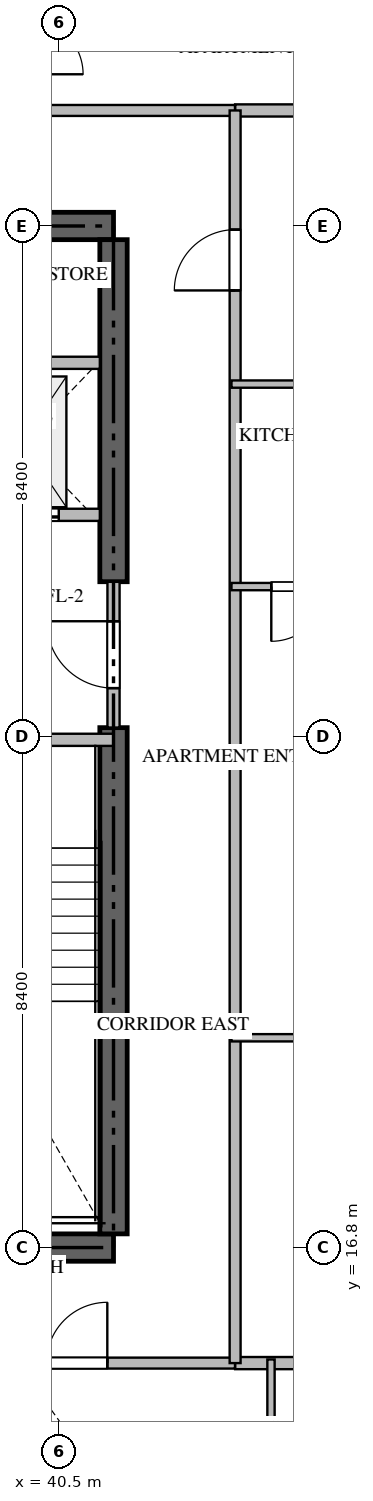
"""IFC4 building model, lengths in metres.
Left out: names, types, materials, properties, quantities, classifications, styles, units other than length and angle.
Written with IfcOpenShell. Run it as: python <this file> out.ifc"""

import sys

from ifc_helpers import new_model, si_unit, direction, frame, frame_2d, origin, place, context, subcontext, project, spatial, rectangle, extrude, source, transform, mapped, element, fill, save


model = new_model("IFC4")
c1 = context("Model", 3, precision=1e-05, world=origin(), true_north=direction((0.0, 1.0)))
c2 = subcontext(c1, "Body", "Model", "MODEL_VIEW")
j1 = project(units=[si_unit("LENGTHUNIT", "METRE"), si_unit("PLANEANGLEUNIT", "RADIAN")], contexts=[c1])
p1 = place(None, origin())
s1 = spatial("IfcSite", under=j1, at=p1, CompositionType="ELEMENT")
p2 = place(p1, origin())
s2 = spatial("IfcBuilding", under=s1, at=p2, CompositionType="ELEMENT")
p3 = place(p2, frame((0.0, 0.0, 56.7)))
s3 = spatial("IfcBuildingStorey", under=s2, at=p3, CompositionType="ELEMENT", Elevation=56.7)
for number, where, z_axis, x_axis in (
    (1, (23.4, 16.8, -0.26), (0.0, 0.0, 1.0), (1.0, 0.0, 0.0)),
    (2, (41.4, 33.6, -0.26), (0.0, 0.0, 1.0), (-1.0, 0.0, 0.0)),
):
    element("IfcWall", number, at=place(p3, frame(where, z_axis=z_axis, x_axis=x_axis)), inside=s3, PredefinedType="SHEAR", context=c2, shape_type="SweptSolid", body=[
        extrude(rectangle(XDim=18.0, YDim=0.45, at=frame_2d((9.0, 0.0))), origin(), (0.0, 0.0, 1.0), 3.748),
    ])
p4 = place(p3, frame((41.4, 17.025, -0.26), z_axis=(0.0, 0.0, 1.0), x_axis=(0.0, 1.0, 0.0)))
e3 = element("IfcWall", 3, at=p4, inside=s3, PredefinedType="SHEAR", context=c2, shape_type="SweptSolid", body=[
    extrude(rectangle(XDim=8.325, YDim=0.45, at=frame_2d((4.163, 0.0))), origin(), (0.0, 0.0, 1.0), 3.748),
])
p5 = place(p3, frame((41.4, 27.75, -0.26), z_axis=(0.0, 0.0, 1.0), x_axis=(0.0, 1.0, 0.0)))
e4 = element("IfcWall", 4, at=p5, inside=s3, PredefinedType="SHEAR", context=c2, shape_type="SweptSolid", body=[
    extrude(rectangle(XDim=5.625, YDim=0.45, at=frame_2d((2.812, 0.0))), origin(), (0.0, 0.0, 1.0), 3.748),
])
p6 = place(p3, frame((36.95, 25.15, 0.0), z_axis=(0.0, 0.0, 1.0), x_axis=(1.0, 0.0, 0.0)))
e5 = element("IfcWall", 5, at=p6, inside=s3, PredefinedType="STANDARD", context=c2, shape_type="SweptSolid", body=[
    extrude(rectangle(XDim=4.45, YDim=0.2, at=frame_2d((2.225, 0.0))), origin(), (0.0, 0.0, 1.0), 3.49),
])
p7 = place(p6, frame((1.65, 0.0, 0.0)))
e6 = element("IfcOpeningElement", 6, at=p7, cuts=e5, PredefinedType="OPENING", context=c2, shape_type="SweptSolid", body=[
    extrude(rectangle(XDim=1.1, YDim=2.15, at=frame_2d((0.55, 1.075))), frame((0.0, 0.11, 0.0), z_axis=(0.0, -1.0, 0.0), x_axis=(1.0, 0.0, 0.0)), (0.0, 0.0, 1.0), 0.22),
])
p8 = place(p3, frame((38.75, 28.85, 0.0), z_axis=(0.0, 0.0, 1.0), x_axis=(1.0, 0.0, 0.0)))
e7 = element("IfcWall", 7, at=p8, inside=s3, PredefinedType="STANDARD", context=c2, shape_type="SweptSolid", body=[
    extrude(rectangle(XDim=2.425, YDim=0.2, at=frame_2d((1.212, 0.0))), origin(), (0.0, 0.0, 1.0), 3.49),
])
p9 = place(p8, frame((0.55, 0.0, 0.0)))
e8 = element("IfcOpeningElement", 8, at=p9, cuts=e7, PredefinedType="OPENING", context=c2, shape_type="SweptSolid", body=[
    extrude(rectangle(XDim=1.2, YDim=2.2, at=frame_2d((0.6, 1.1))), frame((0.0, 0.11, 0.0), z_axis=(0.0, -1.0, 0.0), x_axis=(1.0, 0.0, 0.0)), (0.0, 0.0, 1.0), 0.22),
])
p10 = place(p3, frame((38.75, 31.35, 0.0), z_axis=(0.0, 0.0, 1.0), x_axis=(1.0, 0.0, 0.0)))
e9 = element("IfcWall", 9, at=p10, inside=s3, PredefinedType="STANDARD", context=c2, shape_type="SweptSolid", body=[
    extrude(rectangle(XDim=2.425, YDim=0.2, at=frame_2d((1.212, 0.0))), origin(), (0.0, 0.0, 1.0), 3.49),
])
p11 = place(p3, frame((41.4, 25.352, 0.0), z_axis=(0.0, 0.0, 1.0), x_axis=(0.0, 1.0, 0.0)))
e10 = element("IfcWall", 10, at=p11, inside=s3, PredefinedType="STANDARD", context=c2, shape_type="SweptSolid", body=[
    extrude(rectangle(XDim=2.396, YDim=0.2, at=frame_2d((1.198, 0.0))), origin(), (0.0, 0.0, 1.0), 3.49),
])
p12 = place(p11, frame((0.648, 0.0, 0.0)))
e11 = element("IfcOpeningElement", 11, at=p12, cuts=e10, PredefinedType="OPENING", context=c2, shape_type="SweptSolid", body=[
    extrude(rectangle(XDim=1.1, YDim=2.15, at=frame_2d((0.55, 1.075))), frame((0.0, 0.11, 0.0), z_axis=(0.0, -1.0, 0.0), x_axis=(1.0, 0.0, 0.0)), (0.0, 0.0, 1.0), 0.22),
])
for number, where, z_axis, x_axis in (
    (12, (43.4, 14.9, 0.0), (0.0, 0.0, 1.0), (1.0, 0.0, 0.0)),
    (13, (43.4, 35.5, 0.0), (0.0, 0.0, 1.0), (1.0, 0.0, 0.0)),
):
    element("IfcWall", number, at=place(p3, frame(where, z_axis=z_axis, x_axis=x_axis)), inside=s3, PredefinedType="PARTITIONING", context=c2, shape_type="SweptSolid", body=[
        extrude(rectangle(XDim=15.318, YDim=0.2, at=frame_2d((7.659, 0.0))), origin(), (0.0, 0.0, 1.0), 3.49),
    ])
p13 = place(p3, frame((21.402, 14.9, 0.0), z_axis=(0.0, 0.0, 1.0), x_axis=(1.0, 0.0, 0.0)))
e14 = element("IfcWall", 14, at=p13, inside=s3, PredefinedType="PARTITIONING", context=c2, shape_type="SweptSolid", body=[
    extrude(rectangle(XDim=21.996, YDim=0.18, at=frame_2d((10.998, 0.0))), origin(), (0.0, 0.0, 1.0), 3.49),
])
p14 = place(p13, frame((1.96, 0.0, 0.0)))
e15 = element("IfcOpeningElement", 15, at=p14, cuts=e14, PredefinedType="OPENING", context=c2, shape_type="SweptSolid", body=[
    extrude(rectangle(XDim=1.0, YDim=2.15, at=frame_2d((0.5, 1.075))), frame((0.0, 0.1, 0.0), z_axis=(0.0, -1.0, 0.0), x_axis=(1.0, 0.0, 0.0)), (0.0, 0.0, 1.0), 0.2),
])
p15 = place(p13, frame((5.249, 0.0, 0.0)))
e16 = element("IfcOpeningElement", 16, at=p15, cuts=e14, PredefinedType="OPENING", context=c2, shape_type="SweptSolid", body=[
    extrude(rectangle(XDim=1.0, YDim=2.15, at=frame_2d((0.5, 1.075))), frame((0.0, 0.1, 0.0), z_axis=(0.0, -1.0, 0.0), x_axis=(1.0, 0.0, 0.0)), (0.0, 0.0, 1.0), 0.2),
])
p16 = place(p13, frame((11.653, 0.0, 0.0)))
e17 = element("IfcOpeningElement", 17, at=p16, cuts=e14, PredefinedType="OPENING", context=c2, shape_type="SweptSolid", body=[
    extrude(rectangle(XDim=1.0, YDim=2.15, at=frame_2d((0.5, 1.075))), frame((0.0, 0.1, 0.0), z_axis=(0.0, -1.0, 0.0), x_axis=(1.0, 0.0, 0.0)), (0.0, 0.0, 1.0), 0.2),
])
p17 = place(p13, frame((18.896, 0.0, 0.0)))
e18 = element("IfcOpeningElement", 18, at=p17, cuts=e14, PredefinedType="OPENING", context=c2, shape_type="SweptSolid", body=[
    extrude(rectangle(XDim=1.0, YDim=2.15, at=frame_2d((0.5, 1.075))), frame((0.0, 0.1, 0.0), z_axis=(0.0, -1.0, 0.0), x_axis=(1.0, 0.0, 0.0)), (0.0, 0.0, 1.0), 0.2),
])
p18 = place(p3, frame((21.402, 35.5, 0.0), z_axis=(0.0, 0.0, 1.0), x_axis=(1.0, 0.0, 0.0)))
e19 = element("IfcWall", 19, at=p18, inside=s3, PredefinedType="PARTITIONING", context=c2, shape_type="SweptSolid", body=[
    extrude(rectangle(XDim=21.996, YDim=0.18, at=frame_2d((10.998, 0.0))), origin(), (0.0, 0.0, 1.0), 3.49),
])
p19 = place(p18, frame((15.222, 0.0, 0.0)))
e20 = element("IfcOpeningElement", 20, at=p19, cuts=e19, PredefinedType="OPENING", context=c2, shape_type="SweptSolid", body=[
    extrude(rectangle(XDim=1.0, YDim=2.15, at=frame_2d((0.5, 1.075))), frame((0.0, 0.1, 0.0), z_axis=(0.0, -1.0, 0.0), x_axis=(1.0, 0.0, 0.0)), (0.0, 0.0, 1.0), 0.2),
])
p20 = place(p3, frame((43.4, 14.9, 0.0), z_axis=(0.0, 0.0, 1.0), x_axis=(0.0, 1.0, 0.0)))
e21 = element("IfcWall", 21, at=p20, inside=s3, PredefinedType="PARTITIONING", context=c2, shape_type="SweptSolid", body=[
    extrude(rectangle(XDim=20.6, YDim=0.18, at=frame_2d((10.3, 0.0))), origin(), (0.0, 0.0, 1.0), 3.49),
])
p21 = place(p20, frame((17.64, 0.0, 0.0)))
e22 = element("IfcOpeningElement", 22, at=p21, cuts=e21, PredefinedType="OPENING", context=c2, shape_type="SweptSolid", body=[
    extrude(rectangle(XDim=1.0, YDim=2.15, at=frame_2d((0.5, 1.075))), frame((0.0, 0.1, 0.0), z_axis=(0.0, -1.0, 0.0), x_axis=(1.0, 0.0, 0.0)), (0.0, 0.0, 1.0), 0.2),
])
p22 = place(p3, frame((43.99, 12.15, 0.0), z_axis=(0.0, 0.0, 1.0), x_axis=(0.0, 1.0, 0.0)))
e23 = element("IfcWall", 23, at=p22, inside=s3, PredefinedType="PARTITIONING", context=c2, shape_type="SweptSolid", body=[
    extrude(rectangle(XDim=2.81, YDim=0.12, at=frame_2d((1.405, 0.0))), origin(), (0.0, 0.0, 1.0), 3.49),
])
p23 = place(p3, frame((46.15, 31.0, 0.0), z_axis=(0.0, 0.0, 1.0), x_axis=(-1.0, 0.0, 0.0)))
e24 = element("IfcWall", 24, at=p23, inside=s3, PredefinedType="PARTITIONING", context=c2, shape_type="SweptSolid", body=[
    extrude(rectangle(XDim=2.81, YDim=0.12, at=frame_2d((1.405, 0.0))), origin(), (0.0, 0.0, 1.0), 3.49),
])
p24 = place(p3, frame((45.55, 27.67, 0.0), z_axis=(0.0, 0.0, 1.0), x_axis=(-1.0, 0.0, 0.0)))
e25 = element("IfcWall", 25, at=p24, inside=s3, PredefinedType="PARTITIONING", context=c2, shape_type="SweptSolid", body=[
    extrude(rectangle(XDim=2.21, YDim=0.12, at=frame_2d((1.105, 0.0))), origin(), (0.0, 0.0, 1.0), 3.49),
])
p25 = place(p24, frame((0.655, 0.0, 0.0)))
e26 = element("IfcOpeningElement", 26, at=p25, cuts=e25, PredefinedType="OPENING", context=c2, shape_type="SweptSolid", body=[
    extrude(rectangle(XDim=0.9, YDim=2.1, at=frame_2d((0.45, 1.05))), frame((0.0, 0.07, 0.0), z_axis=(0.0, -1.0, 0.0), x_axis=(1.0, 0.0, 0.0)), (0.0, 0.0, 1.0), 0.14),
])
p26 = place(p3, frame((45.548, 20.25, 0.0), z_axis=(0.0, 0.0, 1.0), x_axis=(-1.0, 0.0, 0.0)))
e27 = element("IfcWall", 27, at=p26, inside=s3, PredefinedType="PARTITIONING", context=c2, shape_type="SweptSolid", body=[
    extrude(rectangle(XDim=2.208, YDim=0.12, at=frame_2d((1.104, 0.0))), origin(), (0.0, 0.0, 1.0), 3.49),
])
m1 = source(origin(), c2, "Body", "SweptSolid", [
    extrude(rectangle(XDim=1.2, YDim=2.2, at=frame_2d((0.6, 1.1))), frame((0.0, 0.025, 0.0), z_axis=(0.0, -1.0, 0.0), x_axis=(1.0, 0.0, 0.0)), (0.0, 0.0, 1.0), 0.05),
])
p27 = place(p9, origin())
e28 = element("IfcDoor", 28, at=p27, inside=s3, OperationType="DOUBLE_DOOR_SLIDING", PredefinedType="DOOR", context=c2, shape_type="MappedRepresentation", body=[
    mapped(m1, transform((0.0, 0.0, 0.0), scale=1.0)),
])
fill(e8, e28)
m2 = source(origin(), c2, "Body", "SweptSolid", [
    extrude(rectangle(XDim=1.1, YDim=2.15, at=frame_2d((0.55, 1.075))), frame((0.0, 0.025, 0.0), z_axis=(0.0, -1.0, 0.0), x_axis=(1.0, 0.0, 0.0)), (0.0, 0.0, 1.0), 0.05),
])
p28 = place(p12, origin())
e29 = element("IfcDoor", 29, at=p28, inside=s3, OperationType="SINGLE_SWING_RIGHT", PredefinedType="DOOR", context=c2, shape_type="MappedRepresentation", body=[
    mapped(m2, transform((0.0, 0.0, 0.0), scale=1.0)),
])
fill(e11, e29)
m3 = source(origin(), c2, "Body", "SweptSolid", [
    extrude(rectangle(XDim=1.0, YDim=2.15, at=frame_2d((0.5, 1.075))), frame((0.0, 0.025, 0.0), z_axis=(0.0, -1.0, 0.0), x_axis=(1.0, 0.0, 0.0)), (0.0, 0.0, 1.0), 0.05),
])
p29 = place(p17, origin())
e30 = element("IfcDoor", 30, at=p29, inside=s3, OperationType="SINGLE_SWING_RIGHT", PredefinedType="DOOR", context=c2, shape_type="MappedRepresentation", body=[
    mapped(m3, transform((0.0, 0.0, 0.0), scale=1.0)),
])
fill(e18, e30)
p30 = place(p21, origin())
e31 = element("IfcDoor", 31, at=p30, inside=s3, OperationType="SINGLE_SWING_LEFT", PredefinedType="DOOR", context=c2, shape_type="MappedRepresentation", body=[
    mapped(m3, transform((0.0, 0.0, 0.0), scale=1.0)),
])
fill(e22, e31)
m4 = source(origin(), c2, "Body", "SweptSolid", [
    extrude(rectangle(XDim=0.9, YDim=2.1, at=frame_2d((0.45, 1.05))), frame((0.0, 0.025, 0.0), z_axis=(0.0, -1.0, 0.0), x_axis=(1.0, 0.0, 0.0)), (0.0, 0.0, 1.0), 0.05),
])
p31 = place(p25, origin())
e32 = element("IfcDoor", 32, at=p31, inside=s3, OperationType="SINGLE_SWING_RIGHT", PredefinedType="DOOR", context=c2, shape_type="MappedRepresentation", body=[
    mapped(m4, transform((0.0, 0.0, 0.0), scale=1.0)),
])
fill(e26, e32)
save(model, sys.argv[1])
